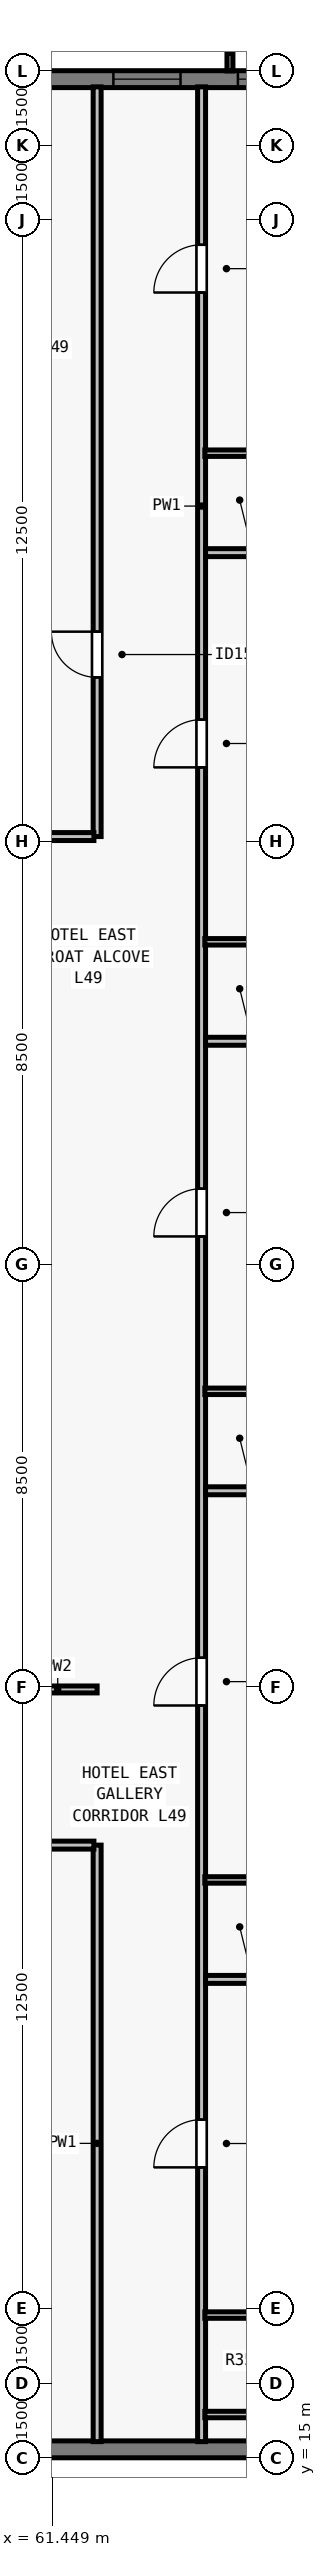
"""IFC4 building model, lengths in metres.
Left out: names, types, materials, properties, quantities, classifications, styles, units other than length and angle.
Written with IfcOpenShell. Run it as: python <this file> out.ifc"""

import sys

from ifc_helpers import new_model, si_unit, direction, frame, frame_2d, origin, place, context, subcontext, project, spatial, rectangle, extrude, element, fill, save


model = new_model("IFC4")
c1 = context("Model", 3, precision=1e-05, world=origin(), true_north=direction((0.0, 1.0)))
c2 = subcontext(c1, "Body", "Model", "MODEL_VIEW")
j1 = project(units=[si_unit("LENGTHUNIT", "METRE"), si_unit("PLANEANGLEUNIT", "RADIAN")], contexts=[c1])
p1 = place(None, origin())
s1 = spatial("IfcSite", under=j1, at=p1, CompositionType="ELEMENT")
p2 = place(p1, origin())
s2 = spatial("IfcBuilding", under=s1, at=p2, CompositionType="ELEMENT")
p3 = place(p2, frame((0.0, 0.0, 179.5)))
s3 = spatial("IfcBuildingStorey", under=s2, at=p3, CompositionType="ELEMENT", Elevation=179.5)
p4 = place(p3, frame((72.0, 15.17, 0.0), z_axis=(0.0, 0.0, 1.0), x_axis=(-1.0, 0.0, 0.0)))
e1 = element("IfcWall", 1, at=p4, inside=s3, PredefinedType="SOLIDWALL", context=c2, shape_type="SweptSolid", body=[
    extrude(rectangle(XDim=39.682, YDim=0.34, at=frame_2d((19.841, 0.0))), origin(), (0.0, 0.0, 1.0), 3.28),
])
p5 = place(p4, frame((11.859, 0.0, 0.8)))
e2 = element("IfcOpeningElement", 2, at=p5, cuts=e1, PredefinedType="OPENING", context=c2, shape_type="SweptSolid", body=[
    extrude(rectangle(XDim=1.75, YDim=1.66, at=frame_2d((0.875, 0.83))), frame((0.0, 0.18, 0.0), z_axis=(0.0, -1.0, 0.0), x_axis=(1.0, 0.0, 0.0)), (0.0, 0.0, 1.0), 0.36),
])
p6 = place(p4, frame((18.966, 0.0, 0.8)))
e3 = element("IfcOpeningElement", 3, at=p6, cuts=e1, PredefinedType="OPENING", context=c2, shape_type="SweptSolid", body=[
    extrude(rectangle(XDim=1.75, YDim=1.66, at=frame_2d((0.875, 0.83))), frame((0.0, 0.18, 0.0), z_axis=(0.0, -1.0, 0.0), x_axis=(1.0, 0.0, 0.0)), (0.0, 0.0, 1.0), 0.36),
])
p7 = place(p4, frame((22.27, 0.0, 0.8)))
e4 = element("IfcOpeningElement", 4, at=p7, cuts=e1, PredefinedType="OPENING", context=c2, shape_type="SweptSolid", body=[
    extrude(rectangle(XDim=1.35, YDim=1.66, at=frame_2d((0.675, 0.83))), frame((0.0, 0.18, 0.0), z_axis=(0.0, -1.0, 0.0), x_axis=(1.0, 0.0, 0.0)), (0.0, 0.0, 1.0), 0.36),
])
p8 = place(p4, frame((26.073, 0.0, 0.8)))
e5 = element("IfcOpeningElement", 5, at=p8, cuts=e1, PredefinedType="OPENING", context=c2, shape_type="SweptSolid", body=[
    extrude(rectangle(XDim=1.75, YDim=1.66, at=frame_2d((0.875, 0.83))), frame((0.0, 0.18, 0.0), z_axis=(0.0, -1.0, 0.0), x_axis=(1.0, 0.0, 0.0)), (0.0, 0.0, 1.0), 0.36),
])
p9 = place(p4, frame((29.827, 0.0, 0.8)))
e6 = element("IfcOpeningElement", 6, at=p9, cuts=e1, PredefinedType="OPENING", context=c2, shape_type="SweptSolid", body=[
    extrude(rectangle(XDim=1.35, YDim=1.66, at=frame_2d((0.675, 0.83))), frame((0.0, 0.18, 0.0), z_axis=(0.0, -1.0, 0.0), x_axis=(1.0, 0.0, 0.0)), (0.0, 0.0, 1.0), 0.36),
])
p10 = place(p3, frame((32.0, 62.83, 0.0), z_axis=(0.0, 0.0, 1.0), x_axis=(1.0, 0.0, 0.0)))
e7 = element("IfcWall", 7, at=p10, inside=s3, PredefinedType="SOLIDWALL", context=c2, shape_type="SweptSolid", body=[
    extrude(rectangle(XDim=39.682, YDim=0.34, at=frame_2d((19.841, 0.0))), origin(), (0.0, 0.0, 1.0), 3.28),
])
p11 = place(p10, frame((3.902, 0.0, 0.8)))
e8 = element("IfcOpeningElement", 8, at=p11, cuts=e7, PredefinedType="OPENING", context=c2, shape_type="SweptSolid", body=[
    extrude(rectangle(XDim=1.75, YDim=1.66, at=frame_2d((0.875, 0.83))), frame((0.0, 0.18, 0.0), z_axis=(0.0, -1.0, 0.0), x_axis=(1.0, 0.0, 0.0)), (0.0, 0.0, 1.0), 0.36),
])
p12 = place(p10, frame((8.505, 0.0, 0.8)))
e9 = element("IfcOpeningElement", 9, at=p12, cuts=e7, PredefinedType="OPENING", context=c2, shape_type="SweptSolid", body=[
    extrude(rectangle(XDim=1.35, YDim=1.66, at=frame_2d((0.675, 0.83))), frame((0.0, 0.18, 0.0), z_axis=(0.0, -1.0, 0.0), x_axis=(1.0, 0.0, 0.0)), (0.0, 0.0, 1.0), 0.36),
])
p13 = place(p10, frame((11.859, 0.0, 0.8)))
e10 = element("IfcOpeningElement", 10, at=p13, cuts=e7, PredefinedType="OPENING", context=c2, shape_type="SweptSolid", body=[
    extrude(rectangle(XDim=1.75, YDim=1.66, at=frame_2d((0.875, 0.83))), frame((0.0, 0.18, 0.0), z_axis=(0.0, -1.0, 0.0), x_axis=(1.0, 0.0, 0.0)), (0.0, 0.0, 1.0), 0.36),
])
p14 = place(p10, frame((16.062, 0.0, 0.8)))
e11 = element("IfcOpeningElement", 11, at=p14, cuts=e7, PredefinedType="OPENING", context=c2, shape_type="SweptSolid", body=[
    extrude(rectangle(XDim=1.35, YDim=1.66, at=frame_2d((0.675, 0.83))), frame((0.0, 0.18, 0.0), z_axis=(0.0, -1.0, 0.0), x_axis=(1.0, 0.0, 0.0)), (0.0, 0.0, 1.0), 0.36),
])
p15 = place(p10, frame((17.716, 0.0, 0.8)))
e12 = element("IfcOpeningElement", 12, at=p15, cuts=e7, PredefinedType="OPENING", context=c2, shape_type="SweptSolid", body=[
    extrude(rectangle(XDim=1.75, YDim=1.66, at=frame_2d((0.875, 0.83))), frame((0.0, 0.18, 0.0), z_axis=(0.0, -1.0, 0.0), x_axis=(1.0, 0.0, 0.0)), (0.0, 0.0, 1.0), 0.36),
])
p16 = place(p10, frame((22.719, 0.0, 0.8)))
e13 = element("IfcOpeningElement", 13, at=p16, cuts=e7, PredefinedType="OPENING", context=c2, shape_type="SweptSolid", body=[
    extrude(rectangle(XDim=1.35, YDim=1.66, at=frame_2d((0.675, 0.83))), frame((0.0, 0.18, 0.0), z_axis=(0.0, -1.0, 0.0), x_axis=(1.0, 0.0, 0.0)), (0.0, 0.0, 1.0), 0.36),
])
p17 = place(p10, frame((26.073, 0.0, 0.8)))
e14 = element("IfcOpeningElement", 14, at=p17, cuts=e7, PredefinedType="OPENING", context=c2, shape_type="SweptSolid", body=[
    extrude(rectangle(XDim=1.75, YDim=1.66, at=frame_2d((0.875, 0.83))), frame((0.0, 0.18, 0.0), z_axis=(0.0, -1.0, 0.0), x_axis=(1.0, 0.0, 0.0)), (0.0, 0.0, 1.0), 0.36),
])
p18 = place(p10, frame((30.677, 0.0, 0.8)))
e15 = element("IfcOpeningElement", 15, at=p18, cuts=e7, PredefinedType="OPENING", context=c2, shape_type="SweptSolid", body=[
    extrude(rectangle(XDim=1.35, YDim=1.66, at=frame_2d((0.675, 0.83))), frame((0.0, 0.18, 0.0), z_axis=(0.0, -1.0, 0.0), x_axis=(1.0, 0.0, 0.0)), (0.0, 0.0, 1.0), 0.36),
])
p19 = place(p10, frame((33.18, 0.0, 0.8)))
e16 = element("IfcOpeningElement", 16, at=p19, cuts=e7, PredefinedType="OPENING", context=c2, shape_type="SweptSolid", body=[
    extrude(rectangle(XDim=1.75, YDim=1.66, at=frame_2d((0.875, 0.83))), frame((0.0, 0.18, 0.0), z_axis=(0.0, -1.0, 0.0), x_axis=(1.0, 0.0, 0.0)), (0.0, 0.0, 1.0), 0.36),
])
p20 = place(p3, frame((64.45, 15.325, 0.0), z_axis=(0.0, 0.0, 1.0), x_axis=(0.0, 1.0, 0.0)))
e17 = element("IfcWall", 17, at=p20, inside=s3, PredefinedType="PARTITIONING", context=c2, shape_type="SweptSolid", body=[
    extrude(rectangle(XDim=47.35, YDim=0.16, at=frame_2d((23.675, 0.0))), origin(), (0.0, 0.0, 1.0), 2.555),
])
p21 = place(p20, frame((5.515, 0.0, 0.0)))
e18 = element("IfcOpeningElement", 18, at=p21, cuts=e17, PredefinedType="OPENING", context=c2, shape_type="SweptSolid", body=[
    extrude(rectangle(XDim=0.96, YDim=2.15, at=frame_2d((0.48, 1.075))), frame((0.0, 0.09, 0.0), z_axis=(0.0, -1.0, 0.0), x_axis=(1.0, 0.0, 0.0)), (0.0, 0.0, 1.0), 0.18),
])
p22 = place(p20, frame((14.802, 0.0, 0.0)))
e19 = element("IfcOpeningElement", 19, at=p22, cuts=e17, PredefinedType="OPENING", context=c2, shape_type="SweptSolid", body=[
    extrude(rectangle(XDim=0.96, YDim=2.15, at=frame_2d((0.48, 1.075))), frame((0.0, 0.09, 0.0), z_axis=(0.0, -1.0, 0.0), x_axis=(1.0, 0.0, 0.0)), (0.0, 0.0, 1.0), 0.18),
])
p23 = place(p20, frame((24.234, 0.0, 0.0)))
e20 = element("IfcOpeningElement", 20, at=p23, cuts=e17, PredefinedType="OPENING", context=c2, shape_type="SweptSolid", body=[
    extrude(rectangle(XDim=0.96, YDim=2.15, at=frame_2d((0.48, 1.075))), frame((0.0, 0.09, 0.0), z_axis=(0.0, -1.0, 0.0), x_axis=(1.0, 0.0, 0.0)), (0.0, 0.0, 1.0), 0.18),
])
p24 = place(p20, frame((33.666, 0.0, 0.0)))
e21 = element("IfcOpeningElement", 21, at=p24, cuts=e17, PredefinedType="OPENING", context=c2, shape_type="SweptSolid", body=[
    extrude(rectangle(XDim=0.96, YDim=2.15, at=frame_2d((0.48, 1.075))), frame((0.0, 0.09, 0.0), z_axis=(0.0, -1.0, 0.0), x_axis=(1.0, 0.0, 0.0)), (0.0, 0.0, 1.0), 0.18),
])
p25 = place(p20, frame((43.214, 0.0, 0.0)))
e22 = element("IfcOpeningElement", 22, at=p25, cuts=e17, PredefinedType="OPENING", context=c2, shape_type="SweptSolid", body=[
    extrude(rectangle(XDim=0.96, YDim=2.15, at=frame_2d((0.48, 1.075))), frame((0.0, 0.09, 0.0), z_axis=(0.0, -1.0, 0.0), x_axis=(1.0, 0.0, 0.0)), (0.0, 0.0, 1.0), 0.18),
])
p26 = place(p3, frame((62.35, 15.325, 0.0), z_axis=(0.0, 0.0, 1.0), x_axis=(0.0, 1.0, 0.0)))
e23 = element("IfcWall", 23, at=p26, inside=s3, PredefinedType="PARTITIONING", context=c2, shape_type="SweptSolid", body=[
    extrude(rectangle(XDim=11.995, YDim=0.16, at=frame_2d((5.998, 0.0))), origin(), (0.0, 0.0, 1.0), 3.28),
])
p27 = place(p3, frame((62.35, 47.6, 0.0), z_axis=(0.0, 0.0, 1.0), x_axis=(0.0, 1.0, 0.0)))
e24 = element("IfcWall", 24, at=p27, inside=s3, PredefinedType="PARTITIONING", context=c2, shape_type="SweptSolid", body=[
    extrude(rectangle(XDim=15.075, YDim=0.16, at=frame_2d((7.538, 0.0))), origin(), (0.0, 0.0, 1.0), 2.555),
])
p28 = place(p27, frame((3.2, 0.0, 0.0)))
e25 = element("IfcOpeningElement", 25, at=p28, cuts=e24, PredefinedType="OPENING", context=c2, shape_type="SweptSolid", body=[
    extrude(rectangle(XDim=0.92, YDim=2.12, at=frame_2d((0.46, 1.06))), frame((0.0, 0.09, 0.0), z_axis=(0.0, -1.0, 0.0), x_axis=(1.0, 0.0, 0.0)), (0.0, 0.0, 1.0), 0.18),
])
p29 = place(p3, frame((60.765, 30.45, 0.0), z_axis=(0.0, 0.0, 1.0), x_axis=(1.0, 0.0, 0.0)))
e26 = element("IfcWall", 26, at=p29, inside=s3, PredefinedType="PARTITIONING", context=c2, shape_type="SweptSolid", body=[
    extrude(rectangle(XDim=1.585, YDim=0.14, at=frame_2d((0.792, 0.0))), origin(), (0.0, 0.0, 1.0), 3.28),
])
p30 = place(p3, frame((60.765, 47.6, 0.0), z_axis=(0.0, 0.0, 1.0), x_axis=(1.0, 0.0, 0.0)))
e27 = element("IfcWall", 27, at=p30, inside=s3, PredefinedType="PARTITIONING", context=c2, shape_type="SweptSolid", body=[
    extrude(rectangle(XDim=1.52, YDim=0.16, at=frame_2d((0.76, 0.0))), origin(), (0.0, 0.0, 1.0), 3.28),
])
p31 = place(p3, frame((40.215, 27.32, 0.0), z_axis=(0.0, 0.0, 1.0), x_axis=(1.0, 0.0, 0.0)))
e28 = element("IfcWall", 28, at=p31, inside=s3, PredefinedType="PARTITIONING", context=c2, shape_type="SweptSolid", body=[
    extrude(rectangle(XDim=22.07, YDim=0.16, at=frame_2d((11.035, 0.0))), origin(), (0.0, 0.0, 1.0), 3.28),
])
p32 = place(p31, frame((3.587, 0.0, 0.0)))
e29 = element("IfcOpeningElement", 29, at=p32, cuts=e28, PredefinedType="OPENING", context=c2, shape_type="SweptSolid", body=[
    extrude(rectangle(XDim=0.96, YDim=2.12, at=frame_2d((0.48, 1.06))), frame((0.0, 0.09, 0.0), z_axis=(0.0, -1.0, 0.0), x_axis=(1.0, 0.0, 0.0)), (0.0, 0.0, 1.0), 0.18),
])
p33 = place(p31, frame((10.61, 0.0, 0.0)))
e30 = element("IfcOpeningElement", 30, at=p33, cuts=e28, PredefinedType="OPENING", context=c2, shape_type="SweptSolid", body=[
    extrude(rectangle(XDim=0.96, YDim=2.12, at=frame_2d((0.48, 1.06))), frame((0.0, 0.09, 0.0), z_axis=(0.0, -1.0, 0.0), x_axis=(1.0, 0.0, 0.0)), (0.0, 0.0, 1.0), 0.18),
])
p34 = place(p31, frame((17.578, 0.0, 0.0)))
e31 = element("IfcOpeningElement", 31, at=p34, cuts=e28, PredefinedType="OPENING", context=c2, shape_type="SweptSolid", body=[
    extrude(rectangle(XDim=0.96, YDim=2.12, at=frame_2d((0.48, 1.06))), frame((0.0, 0.09, 0.0), z_axis=(0.0, -1.0, 0.0), x_axis=(1.0, 0.0, 0.0)), (0.0, 0.0, 1.0), 0.18),
])
for number, where, z_axis, x_axis in (
    (32, (64.515, 15.87, 0.0), (0.0, 0.0, 1.0), (1.0, 0.0, 0.0)),
    (33, (64.515, 17.87, 0.0), (0.0, 0.0, 1.0), (1.0, 0.0, 0.0)),
):
    element("IfcWall", number, at=place(p3, frame(where, z_axis=z_axis, x_axis=x_axis)), inside=s3, PredefinedType="PLUMBINGWALL", context=c2, shape_type="SweptSolid", body=[
        extrude(rectangle(XDim=2.315, YDim=0.13, at=frame_2d((1.158, 0.0))), origin(), (0.0, 0.0, 1.0), 3.28),
    ])
p35 = place(p3, frame((64.53, 24.62, 0.0), z_axis=(0.0, 0.0, 1.0), x_axis=(1.0, 0.0, 0.0)))
e34 = element("IfcWall", 34, at=p35, inside=s3, PredefinedType="PARTITIONING", context=c2, shape_type="SweptSolid", body=[
    extrude(rectangle(XDim=11.145, YDim=0.16, at=frame_2d((5.573, 0.0))), origin(), (0.0, 0.0, 1.0), 2.896),
])
p36 = place(p3, frame((64.515, 26.62, 0.0), z_axis=(0.0, 0.0, 1.0), x_axis=(1.0, 0.0, 0.0)))
e35 = element("IfcWall", 35, at=p36, inside=s3, PredefinedType="PLUMBINGWALL", context=c2, shape_type="SweptSolid", body=[
    extrude(rectangle(XDim=2.315, YDim=0.13, at=frame_2d((1.158, 0.0))), origin(), (0.0, 0.0, 1.0), 2.896),
])
p37 = place(p3, frame((64.53, 34.445, 0.0), z_axis=(0.0, 0.0, 1.0), x_axis=(1.0, 0.0, 0.0)))
e36 = element("IfcWall", 36, at=p37, inside=s3, PredefinedType="PARTITIONING", context=c2, shape_type="SweptSolid", body=[
    extrude(rectangle(XDim=11.145, YDim=0.16, at=frame_2d((5.573, 0.0))), origin(), (0.0, 0.0, 1.0), 3.28),
])
p38 = place(p3, frame((64.515, 36.445, 0.0), z_axis=(0.0, 0.0, 1.0), x_axis=(1.0, 0.0, 0.0)))
e37 = element("IfcWall", 37, at=p38, inside=s3, PredefinedType="PLUMBINGWALL", context=c2, shape_type="SweptSolid", body=[
    extrude(rectangle(XDim=2.315, YDim=0.13, at=frame_2d((1.158, 0.0))), origin(), (0.0, 0.0, 1.0), 3.28),
])
p39 = place(p3, frame((64.53, 43.484, 0.0), z_axis=(0.0, 0.0, 1.0), x_axis=(1.0, 0.0, 0.0)))
e38 = element("IfcWall", 38, at=p39, inside=s3, PredefinedType="PARTITIONING", context=c2, shape_type="SweptSolid", body=[
    extrude(rectangle(XDim=11.145, YDim=0.16, at=frame_2d((5.573, 0.0))), origin(), (0.0, 0.0, 1.0), 3.28),
])
p40 = place(p3, frame((64.515, 45.484, 0.0), z_axis=(0.0, 0.0, 1.0), x_axis=(1.0, 0.0, 0.0)))
e39 = element("IfcWall", 39, at=p40, inside=s3, PredefinedType="PLUMBINGWALL", context=c2, shape_type="SweptSolid", body=[
    extrude(rectangle(XDim=2.315, YDim=0.13, at=frame_2d((1.158, 0.0))), origin(), (0.0, 0.0, 1.0), 3.28),
])
p41 = place(p3, frame((64.53, 53.309, 0.0), z_axis=(0.0, 0.0, 1.0), x_axis=(1.0, 0.0, 0.0)))
e40 = element("IfcWall", 40, at=p41, inside=s3, PredefinedType="PARTITIONING", context=c2, shape_type="SweptSolid", body=[
    extrude(rectangle(XDim=11.145, YDim=0.16, at=frame_2d((5.573, 0.0))), origin(), (0.0, 0.0, 1.0), 2.896),
])
p42 = place(p3, frame((64.515, 55.309, 0.0), z_axis=(0.0, 0.0, 1.0), x_axis=(1.0, 0.0, 0.0)))
e41 = element("IfcWall", 41, at=p42, inside=s3, PredefinedType="PLUMBINGWALL", context=c2, shape_type="SweptSolid", body=[
    extrude(rectangle(XDim=2.315, YDim=0.13, at=frame_2d((1.158, 0.0))), origin(), (0.0, 0.0, 1.0), 3.28),
])
p43 = place(p18, origin())
e42 = element("IfcWindow", 42, at=p43, inside=s3, PartitioningType="SINGLE_PANEL", PredefinedType="WINDOW", context=c2, shape_type="SweptSolid", body=[
    extrude(rectangle(XDim=1.35, YDim=1.66, at=frame_2d((0.675, 0.83))), frame((0.0, -0.05, 0.0), z_axis=(0.0, -1.0, 0.0), x_axis=(1.0, 0.0, 0.0)), (0.0, 0.0, 1.0), 0.06),
])
fill(e15, e42)
p44 = place(p19, origin())
e43 = element("IfcWindow", 43, at=p44, inside=s3, PartitioningType="SINGLE_PANEL", PredefinedType="WINDOW", context=c2, shape_type="SweptSolid", body=[
    extrude(rectangle(XDim=1.75, YDim=1.66, at=frame_2d((0.875, 0.83))), frame((0.0, -0.05, 0.0), z_axis=(0.0, -1.0, 0.0), x_axis=(1.0, 0.0, 0.0)), (0.0, 0.0, 1.0), 0.06),
])
fill(e16, e43)
p45 = place(p28, origin())
e44 = element("IfcDoor", 44, at=p45, inside=s3, OperationType="SINGLE_SWING_RIGHT", PredefinedType="DOOR", context=c2, shape_type="SweptSolid", body=[
    extrude(rectangle(XDim=0.92, YDim=2.12, at=frame_2d((0.46, 1.06))), frame((0.0, 0.025, 0.0), z_axis=(0.0, -1.0, 0.0), x_axis=(1.0, 0.0, 0.0)), (0.0, 0.0, 1.0), 0.05),
])
fill(e25, e44)
p46 = place(p21, origin())
e45 = element("IfcDoor", 45, at=p46, inside=s3, OperationType="SINGLE_SWING_LEFT", PredefinedType="DOOR", context=c2, shape_type="SweptSolid", body=[
    extrude(rectangle(XDim=0.96, YDim=2.15, at=frame_2d((0.48, 1.075))), frame((0.0, 0.025, 0.0), z_axis=(0.0, -1.0, 0.0), x_axis=(1.0, 0.0, 0.0)), (0.0, 0.0, 1.0), 0.05),
])
fill(e18, e45)
p47 = place(p22, origin())
e46 = element("IfcDoor", 46, at=p47, inside=s3, OperationType="SINGLE_SWING_LEFT", PredefinedType="DOOR", context=c2, shape_type="SweptSolid", body=[
    extrude(rectangle(XDim=0.96, YDim=2.15, at=frame_2d((0.48, 1.075))), frame((0.0, 0.025, 0.0), z_axis=(0.0, -1.0, 0.0), x_axis=(1.0, 0.0, 0.0)), (0.0, 0.0, 1.0), 0.05),
])
fill(e19, e46)
p48 = place(p23, origin())
e47 = element("IfcDoor", 47, at=p48, inside=s3, OperationType="SINGLE_SWING_LEFT", PredefinedType="DOOR", context=c2, shape_type="SweptSolid", body=[
    extrude(rectangle(XDim=0.96, YDim=2.15, at=frame_2d((0.48, 1.075))), frame((0.0, 0.025, 0.0), z_axis=(0.0, -1.0, 0.0), x_axis=(1.0, 0.0, 0.0)), (0.0, 0.0, 1.0), 0.05),
])
fill(e20, e47)
p49 = place(p24, origin())
e48 = element("IfcDoor", 48, at=p49, inside=s3, OperationType="SINGLE_SWING_LEFT", PredefinedType="DOOR", context=c2, shape_type="SweptSolid", body=[
    extrude(rectangle(XDim=0.96, YDim=2.15, at=frame_2d((0.48, 1.075))), frame((0.0, 0.025, 0.0), z_axis=(0.0, -1.0, 0.0), x_axis=(1.0, 0.0, 0.0)), (0.0, 0.0, 1.0), 0.05),
])
fill(e21, e48)
p50 = place(p25, origin())
e49 = element("IfcDoor", 49, at=p50, inside=s3, OperationType="SINGLE_SWING_LEFT", PredefinedType="DOOR", context=c2, shape_type="SweptSolid", body=[
    extrude(rectangle(XDim=0.96, YDim=2.15, at=frame_2d((0.48, 1.075))), frame((0.0, 0.025, 0.0), z_axis=(0.0, -1.0, 0.0), x_axis=(1.0, 0.0, 0.0)), (0.0, 0.0, 1.0), 0.05),
])
fill(e22, e49)
save(model, sys.argv[1])
